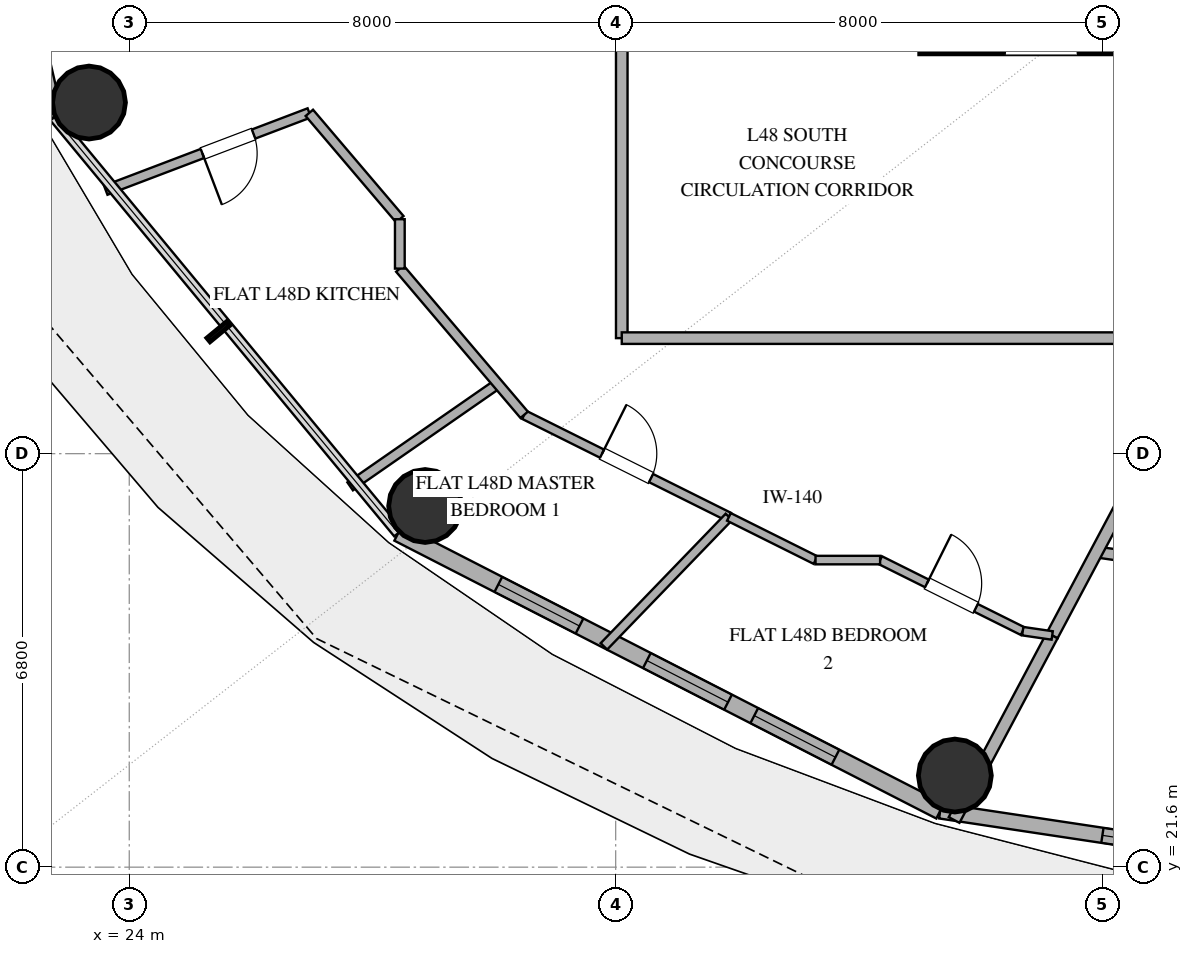
"""IFC4 building model, lengths in metres.
Left out: names, types, materials, properties, quantities, classifications, styles, units other than length and angle.
Written with IfcOpenShell. Run it as: python <this file> out.ifc"""

import sys

from ifc_helpers import new_model, si_unit, direction, frame, frame_2d, origin, origin_2d, place, context, subcontext, project, spatial, rectangle, hollow_circle, extrude, element, fill, save


model = new_model("IFC4")
c1 = context("Model", 3, precision=1e-05, world=origin(), true_north=direction((0.0, 1.0)))
c2 = subcontext(c1, "Body", "Model", "MODEL_VIEW")
j1 = project(units=[si_unit("LENGTHUNIT", "METRE"), si_unit("PLANEANGLEUNIT", "RADIAN")], contexts=[c1])
p1 = place(None, origin())
s1 = spatial("IfcSite", under=j1, at=p1, CompositionType="ELEMENT")
p2 = place(p1, origin())
s2 = spatial("IfcBuilding", under=s1, at=p2, CompositionType="ELEMENT")
p3 = place(p2, frame((0.0, 0.0, 190.2)))
s3 = spatial("IfcBuildingStorey", under=s2, at=p3, CompositionType="ELEMENT", Elevation=190.2)
p4 = place(p3, frame((37.0, 35.2, 0.0), z_axis=(0.0, 0.0, 1.0), x_axis=(1.0, 0.0, 0.0)))
e1 = element("IfcWall", 1, at=p4, inside=s3, PredefinedType="SHEAR", context=c2, shape_type="SweptSolid", body=[
    extrude(rectangle(XDim=4.0, YDim=0.45, at=frame_2d((2.0, 0.0))), origin(), (0.0, 0.0, 1.0), 3.38),
])
p5 = place(p4, frame((1.4, 0.0, 0.0)))
e2 = element("IfcOpeningElement", 2, at=p5, cuts=e1, PredefinedType="OPENING", context=c2, shape_type="SweptSolid", body=[
    extrude(rectangle(XDim=1.2, YDim=2.15, at=frame_2d((0.6, 1.075))), frame((0.0, 0.235, 0.0), z_axis=(0.0, -1.0, 0.0), x_axis=(1.0, 0.0, 0.0)), (0.0, 0.0, 1.0), 0.47),
])
for number, where, z_axis, x_axis in (
    (3, (23.338, 34.174, 0.0), (0.0, 0.0, 1.0), (1.0, 0.0, 0.0)),
    (4, (28.866, 27.54, 0.0), (0.0, 0.0, 1.0), (1.0, 0.0, 0.0)),
    (5, (37.578, 23.107, 0.0), (0.0, 0.0, 1.0), (1.0, 0.0, 0.0)),
):
    element("IfcColumn", number, at=place(p3, frame(where, z_axis=z_axis, x_axis=x_axis)), inside=s3, PredefinedType="COLUMN", context=c2, shape_type="SweptSolid", body=[
        extrude(hollow_circle(Radius=0.6, WallThickness=0.032, at=origin_2d()), origin(), (0.0, 0.0, 1.0), 3.38),
    ])
p6 = place(p3, frame((20.901, 42.0, 0.0), z_axis=(0.0, 0.0, 1.0), x_axis=(0.225473184558, -0.974249374157, 0.0)))
e6 = element("IfcWall", 6, at=p6, inside=s3, PredefinedType="SOLIDWALL", context=c2, shape_type="SweptSolid", body=[
    extrude(rectangle(XDim=8.28, YDim=0.28, at=frame_2d((4.14, 0.0))), origin(), (0.0, 0.0, 1.0), 3.38),
])
p7 = place(p6, frame((5.644, 0.0, 0.0)))
e7 = element("IfcOpeningElement", 7, at=p7, cuts=e6, PredefinedType="OPENING", context=c2, shape_type="SweptSolid", body=[
    extrude(rectangle(XDim=1.1, YDim=2.25, at=frame_2d((0.55, 1.125))), frame((0.0, 0.15, 0.0), z_axis=(0.0, -1.0, 0.0), x_axis=(1.0, 0.0, 0.0)), (0.0, 0.0, 1.0), 0.3),
])
p8 = place(p3, frame((28.424, 27.094, 0.0), z_axis=(0.0, 0.0, 1.0), x_axis=(0.889872523182, -0.456209263919, 0.0)))
e8 = element("IfcWall", 8, at=p8, inside=s3, PredefinedType="SOLIDWALL", context=c2, shape_type="SweptSolid", body=[
    extrude(rectangle(XDim=10.016, YDim=0.28, at=frame_2d((5.008, 0.0))), origin(), (0.0, 0.0, 1.0), 3.38),
])
p9 = place(p8, frame((1.85, 0.0, 0.85)))
e9 = element("IfcOpeningElement", 9, at=p9, cuts=e8, PredefinedType="OPENING", context=c2, shape_type="SweptSolid", body=[
    extrude(rectangle(XDim=1.5, YDim=2.0, at=frame_2d((0.75, 1.0))), frame((0.0, 0.15, 0.0), z_axis=(0.0, -1.0, 0.0), x_axis=(1.0, 0.0, 0.0)), (0.0, 0.0, 1.0), 0.3),
])
p10 = place(p8, frame((4.595, 0.0, 0.85)))
e10 = element("IfcOpeningElement", 10, at=p10, cuts=e8, PredefinedType="OPENING", context=c2, shape_type="SweptSolid", body=[
    extrude(rectangle(XDim=1.5, YDim=1.8, at=frame_2d((0.75, 0.9))), frame((0.0, 0.15, 0.0), z_axis=(0.0, -1.0, 0.0), x_axis=(1.0, 0.0, 0.0)), (0.0, 0.0, 1.0), 0.3),
])
p11 = place(p8, frame((6.58, 0.0, 0.85)))
e11 = element("IfcOpeningElement", 11, at=p11, cuts=e8, PredefinedType="OPENING", context=c2, shape_type="SweptSolid", body=[
    extrude(rectangle(XDim=1.5, YDim=1.8, at=frame_2d((0.75, 0.9))), frame((0.0, 0.15, 0.0), z_axis=(0.0, -1.0, 0.0), x_axis=(1.0, 0.0, 0.0)), (0.0, 0.0, 1.0), 0.3),
])
p12 = place(p3, frame((37.337, 22.525, 0.0), z_axis=(0.0, 0.0, 1.0), x_axis=(0.988863993413, -0.148822049884, 0.0)))
e12 = element("IfcWall", 12, at=p12, inside=s3, PredefinedType="SOLIDWALL", context=c2, shape_type="SweptSolid", body=[
    extrude(rectangle(XDim=10.783, YDim=0.25, at=frame_2d((5.392, 0.0))), origin(), (0.0, 0.0, 1.0), 3.38),
])
p13 = place(p12, frame((2.698, 0.0, 1.42)))
e13 = element("IfcOpeningElement", 13, at=p13, cuts=e12, PredefinedType="OPENING", context=c2, shape_type="SweptSolid", body=[
    extrude(rectangle(XDim=1.0, YDim=1.05, at=frame_2d((0.5, 0.525))), frame((0.0, 0.135, 0.0), z_axis=(0.0, -1.0, 0.0), x_axis=(1.0, 0.0, 0.0)), (0.0, 0.0, 1.0), 0.27),
])
p14 = place(p3, frame((32.1, 30.3, 0.0), z_axis=(0.0, 0.0, 1.0), x_axis=(0.0, 1.0, 0.0)))
e14 = element("IfcWall", 14, at=p14, inside=s3, PredefinedType="PARTITIONING", context=c2, shape_type="SweptSolid", body=[
    extrude(rectangle(XDim=12.287, YDim=0.19, at=frame_2d((6.144, 0.0))), origin(), (0.0, 0.0, 1.0), 2.74),
])
p15 = place(p14, frame((5.601, 0.0, 0.0)))
e15 = element("IfcOpeningElement", 15, at=p15, cuts=e14, PredefinedType="OPENING", context=c2, shape_type="SweptSolid", body=[
    extrude(rectangle(XDim=1.0, YDim=2.2, at=frame_2d((0.5, 1.1))), frame((0.0, 0.105, 0.0), z_axis=(0.0, -1.0, 0.0), x_axis=(1.0, 0.0, 0.0)), (0.0, 0.0, 1.0), 0.21),
])
p16 = place(p3, frame((41.815, 30.3, 0.0), z_axis=(0.0, 0.0, 1.0), x_axis=(-1.0, 0.0, 0.0)))
e16 = element("IfcWall", 16, at=p16, inside=s3, PredefinedType="PARTITIONING", context=c2, shape_type="SweptSolid", body=[
    extrude(rectangle(XDim=9.715, YDim=0.19, at=frame_2d((4.857, 0.0))), origin(), (0.0, 0.0, 1.0), 2.74),
])
p17 = place(p3, frame((39.909, 26.783, 0.0), z_axis=(0.0, 0.0, 1.0), x_axis=(0.989831677838, -0.142243627443, 0.0)))
e17 = element("IfcWall", 17, at=p17, inside=s3, PredefinedType="PLUMBINGWALL", context=c2, shape_type="SweptSolid", body=[
    extrude(rectangle(XDim=4.406, YDim=0.18, at=frame_2d((2.203, 0.0))), origin(), (0.0, 0.0, 1.0), 2.74),
])
p18 = place(p17, frame((1.778, 0.0, 0.0)))
e18 = element("IfcOpeningElement", 18, at=p18, cuts=e17, PredefinedType="OPENING", context=c2, shape_type="SweptSolid", body=[
    extrude(rectangle(XDim=0.85, YDim=2.1, at=frame_2d((0.425, 1.05))), frame((0.0, 0.1, 0.0), z_axis=(0.0, -1.0, 0.0), x_axis=(1.0, 0.0, 0.0)), (0.0, 0.0, 1.0), 0.2),
])
p19 = place(p3, frame((39.179, 25.41, 0.0), z_axis=(0.0, 0.0, 1.0), x_axis=(0.469450659963, 0.88295870677, 0.0)))
e19 = element("IfcWall", 19, at=p19, inside=s3, PredefinedType="PARTITIONING", context=c2, shape_type="SweptSolid", body=[
    extrude(rectangle(XDim=5.538, YDim=0.2, at=frame_2d((2.769, 0.0))), origin(), (0.0, 0.0, 1.0), 2.74),
])
p20 = place(p3, frame((30.495, 29.039, 0.0), z_axis=(0.0, 0.0, 1.0), x_axis=(0.894945698469, -0.44617507415, 0.0)))
e20 = element("IfcWall", 20, at=p20, inside=s3, PredefinedType="PARTITIONING", context=c2, shape_type="SweptSolid", body=[
    extrude(rectangle(XDim=3.762, YDim=0.15, at=frame_2d((1.881, 0.0))), origin(), (0.0, 0.0, 1.0), 2.74),
])
p21 = place(p20, frame((1.431, 0.0, 0.0)))
e21 = element("IfcOpeningElement", 21, at=p21, cuts=e20, PredefinedType="OPENING", context=c2, shape_type="SweptSolid", body=[
    extrude(rectangle(XDim=0.9, YDim=2.1, at=frame_2d((0.45, 1.05))), frame((0.0, 0.085, 0.0), z_axis=(0.0, -1.0, 0.0), x_axis=(1.0, 0.0, 0.0)), (0.0, 0.0, 1.0), 0.17),
])
p22 = place(p3, frame((26.962, 34.005, 0.0), z_axis=(0.0, 0.0, 1.0), x_axis=(-0.934799422257, -0.355176069222, 0.0)))
e22 = element("IfcWall", 22, at=p22, inside=s3, PredefinedType="PLUMBINGWALL", context=c2, shape_type="SweptSolid", body=[
    extrude(rectangle(XDim=3.582, YDim=0.16, at=frame_2d((1.791, 0.0))), origin(), (0.0, 0.0, 1.0), 2.74),
])
p23 = place(p22, frame((0.981, 0.0, 0.0)))
e23 = element("IfcOpeningElement", 23, at=p23, cuts=e22, PredefinedType="OPENING", context=c2, shape_type="SweptSolid", body=[
    extrude(rectangle(XDim=0.9, YDim=2.1, at=frame_2d((0.45, 1.05))), frame((0.0, 0.09, 0.0), z_axis=(0.0, -1.0, 0.0), x_axis=(1.0, 0.0, 0.0)), (0.0, 0.0, 1.0), 0.18),
])
p24 = place(p3, frame((39.179, 25.41, 0.0), z_axis=(0.0, 0.0, 1.0), x_axis=(-0.469492799927, -0.882936300543, 0.0)))
e24 = element("IfcWall", 24, at=p24, inside=s3, PredefinedType="PARTITIONING", context=c2, shape_type="SweptSolid", body=[
    extrude(rectangle(XDim=3.437, YDim=0.2, at=frame_2d((1.718, 0.0))), origin(), (0.0, 0.0, 1.0), 2.74),
])
p25 = place(p3, frame((33.862, 27.36, 0.0), z_axis=(0.0, 0.0, 1.0), x_axis=(-0.694625426755, -0.719371612246, 0.0)))
e25 = element("IfcWall", 25, at=p25, inside=s3, PredefinedType="PARTITIONING", context=c2, shape_type="SweptSolid", body=[
    extrude(rectangle(XDim=2.96, YDim=0.15, at=frame_2d((1.48, 0.0))), origin(), (0.0, 0.0, 1.0), 2.74),
])
p26 = place(p3, frame((30.062, 29.548, 0.0), z_axis=(0.0, 0.0, 1.0), x_axis=(-0.821498907673, -0.570210088207, 0.0)))
e26 = element("IfcWall", 26, at=p26, inside=s3, PredefinedType="PLUMBINGWALL", context=c2, shape_type="SweptSolid", body=[
    extrude(rectangle(XDim=2.957, YDim=0.16, at=frame_2d((1.478, 0.0))), origin(), (0.0, 0.0, 1.0), 2.74),
])
p27 = place(p3, frame((36.349, 26.65, 0.0), z_axis=(0.0, 0.0, 1.0), x_axis=(0.895041110332, -0.445983644112, 0.0)))
e27 = element("IfcWall", 27, at=p27, inside=s3, PredefinedType="PARTITIONING", context=c2, shape_type="SweptSolid", body=[
    extrude(rectangle(XDim=2.621, YDim=0.14, at=frame_2d((1.311, 0.0))), origin(), (0.0, 0.0, 1.0), 2.74),
])
p28 = place(p27, frame((0.861, 0.0, 0.0)))
e28 = element("IfcOpeningElement", 28, at=p28, cuts=e27, PredefinedType="OPENING", context=c2, shape_type="SweptSolid", body=[
    extrude(rectangle(XDim=0.9, YDim=2.1, at=frame_2d((0.45, 1.05))), frame((0.0, 0.08, 0.0), z_axis=(0.0, -1.0, 0.0), x_axis=(1.0, 0.0, 0.0)), (0.0, 0.0, 1.0), 0.16),
])
p29 = place(p3, frame((30.495, 29.039, 0.0), z_axis=(0.0, 0.0, 1.0), x_axis=(-0.647888606369, 0.761735094201, 0.0)))
e29 = element("IfcWall", 29, at=p29, inside=s3, PredefinedType="PLUMBINGWALL", context=c2, shape_type="SweptSolid", body=[
    extrude(rectangle(XDim=3.157, YDim=0.16, at=frame_2d((1.578, 0.0))), origin(), (0.0, 0.0, 1.0), 2.74),
])
p30 = place(p3, frame((28.45, 32.256, 0.0), z_axis=(0.0, 0.0, 1.0), x_axis=(-0.648055662854, 0.761592973866, 0.0)))
e30 = element("IfcWall", 30, at=p30, inside=s3, PredefinedType="PLUMBINGWALL", context=c2, shape_type="SweptSolid", body=[
    extrude(rectangle(XDim=2.297, YDim=0.16, at=frame_2d((1.148, 0.0))), origin(), (0.0, 0.0, 1.0), 2.74),
])
p31 = place(p3, frame((33.862, 27.36, 0.0), z_axis=(0.0, 0.0, 1.0), x_axis=(0.894917522296, -0.446231585937, 0.0)))
e31 = element("IfcWall", 31, at=p31, inside=s3, PredefinedType="PARTITIONING", context=c2, shape_type="SweptSolid", body=[
    extrude(rectangle(XDim=1.592, YDim=0.14, at=frame_2d((0.796, 0.0))), origin(), (0.0, 0.0, 1.0), 2.74),
])
p32 = place(p3, frame((35.287, 26.65, 0.0), z_axis=(0.0, 0.0, 1.0), x_axis=(1.0, 0.0, 0.0)))
e32 = element("IfcWall", 32, at=p32, inside=s3, PredefinedType="PARTITIONING", context=c2, shape_type="SweptSolid", body=[
    extrude(rectangle(XDim=1.062, YDim=0.14, at=frame_2d((0.531, 0.0))), origin(), (0.0, 0.0, 1.0), 2.74),
])
p33 = place(p3, frame((28.45, 31.443, 0.0), z_axis=(0.0, 0.0, 1.0), x_axis=(0.0, 1.0, 0.0)))
e33 = element("IfcWall", 33, at=p33, inside=s3, PredefinedType="PLUMBINGWALL", context=c2, shape_type="SweptSolid", body=[
    extrude(rectangle(XDim=0.812, YDim=0.16, at=frame_2d((0.406, 0.0))), origin(), (0.0, 0.0, 1.0), 2.74),
])
p34 = place(p3, frame((38.695, 25.481, 0.0), z_axis=(0.0, 0.0, 1.0), x_axis=(0.989485449351, -0.144632449754, 0.0)))
e34 = element("IfcWall", 34, at=p34, inside=s3, PredefinedType="PARTITIONING", context=c2, shape_type="SweptSolid", body=[
    extrude(rectangle(XDim=0.49, YDim=0.14, at=frame_2d((0.245, 0.0))), origin(), (0.0, 0.0, 1.0), 2.74),
])
p35 = place(p9, origin())
e35 = element("IfcWindow", 35, at=p35, inside=s3, PartitioningType="SINGLE_PANEL", PredefinedType="WINDOW", context=c2, shape_type="SweptSolid", body=[
    extrude(rectangle(XDim=1.5, YDim=2.0, at=frame_2d((0.75, 1.0))), frame((0.0, 0.03, 0.0), z_axis=(0.0, -1.0, 0.0), x_axis=(1.0, 0.0, 0.0)), (0.0, 0.0, 1.0), 0.06),
])
fill(e9, e35)
p36 = place(p10, origin())
e36 = element("IfcWindow", 36, at=p36, inside=s3, PartitioningType="SINGLE_PANEL", PredefinedType="WINDOW", context=c2, shape_type="SweptSolid", body=[
    extrude(rectangle(XDim=1.5, YDim=1.8, at=frame_2d((0.75, 0.9))), frame((0.0, 0.03, 0.0), z_axis=(0.0, -1.0, 0.0), x_axis=(1.0, 0.0, 0.0)), (0.0, 0.0, 1.0), 0.06),
])
fill(e10, e36)
p37 = place(p11, origin())
e37 = element("IfcWindow", 37, at=p37, inside=s3, PartitioningType="SINGLE_PANEL", PredefinedType="WINDOW", context=c2, shape_type="SweptSolid", body=[
    extrude(rectangle(XDim=1.5, YDim=1.8, at=frame_2d((0.75, 0.9))), frame((0.0, 0.03, 0.0), z_axis=(0.0, -1.0, 0.0), x_axis=(1.0, 0.0, 0.0)), (0.0, 0.0, 1.0), 0.06),
])
fill(e11, e37)
p38 = place(p13, origin())
e38 = element("IfcWindow", 38, at=p38, inside=s3, PartitioningType="SINGLE_PANEL", PredefinedType="WINDOW", context=c2, shape_type="SweptSolid", body=[
    extrude(rectangle(XDim=1.0, YDim=1.05, at=frame_2d((0.5, 0.525))), frame((0.0, 0.03, 0.0), z_axis=(0.0, -1.0, 0.0), x_axis=(1.0, 0.0, 0.0)), (0.0, 0.0, 1.0), 0.06),
])
fill(e13, e38)
p39 = place(p21, origin())
e39 = element("IfcDoor", 39, at=p39, inside=s3, OperationType="SINGLE_SWING_LEFT", PredefinedType="DOOR", context=c2, shape_type="SweptSolid", body=[
    extrude(rectangle(XDim=0.9, YDim=2.1, at=frame_2d((0.45, 1.05))), frame((0.0, 0.025, 0.0), z_axis=(0.0, -1.0, 0.0), x_axis=(1.0, 0.0, 0.0)), (0.0, 0.0, 1.0), 0.05),
])
fill(e21, e39)
p40 = place(p23, origin())
e40 = element("IfcDoor", 40, at=p40, inside=s3, OperationType="SINGLE_SWING_RIGHT", PredefinedType="DOOR", context=c2, shape_type="SweptSolid", body=[
    extrude(rectangle(XDim=0.9, YDim=2.1, at=frame_2d((0.45, 1.05))), frame((0.0, 0.025, 0.0), z_axis=(0.0, -1.0, 0.0), x_axis=(1.0, 0.0, 0.0)), (0.0, 0.0, 1.0), 0.05),
])
fill(e23, e40)
p41 = place(p28, origin())
e41 = element("IfcDoor", 41, at=p41, inside=s3, OperationType="SINGLE_SWING_LEFT", PredefinedType="DOOR", context=c2, shape_type="SweptSolid", body=[
    extrude(rectangle(XDim=0.9, YDim=2.1, at=frame_2d((0.45, 1.05))), frame((0.0, 0.025, 0.0), z_axis=(0.0, -1.0, 0.0), x_axis=(1.0, 0.0, 0.0)), (0.0, 0.0, 1.0), 0.05),
])
fill(e28, e41)
save(model, sys.argv[1])
